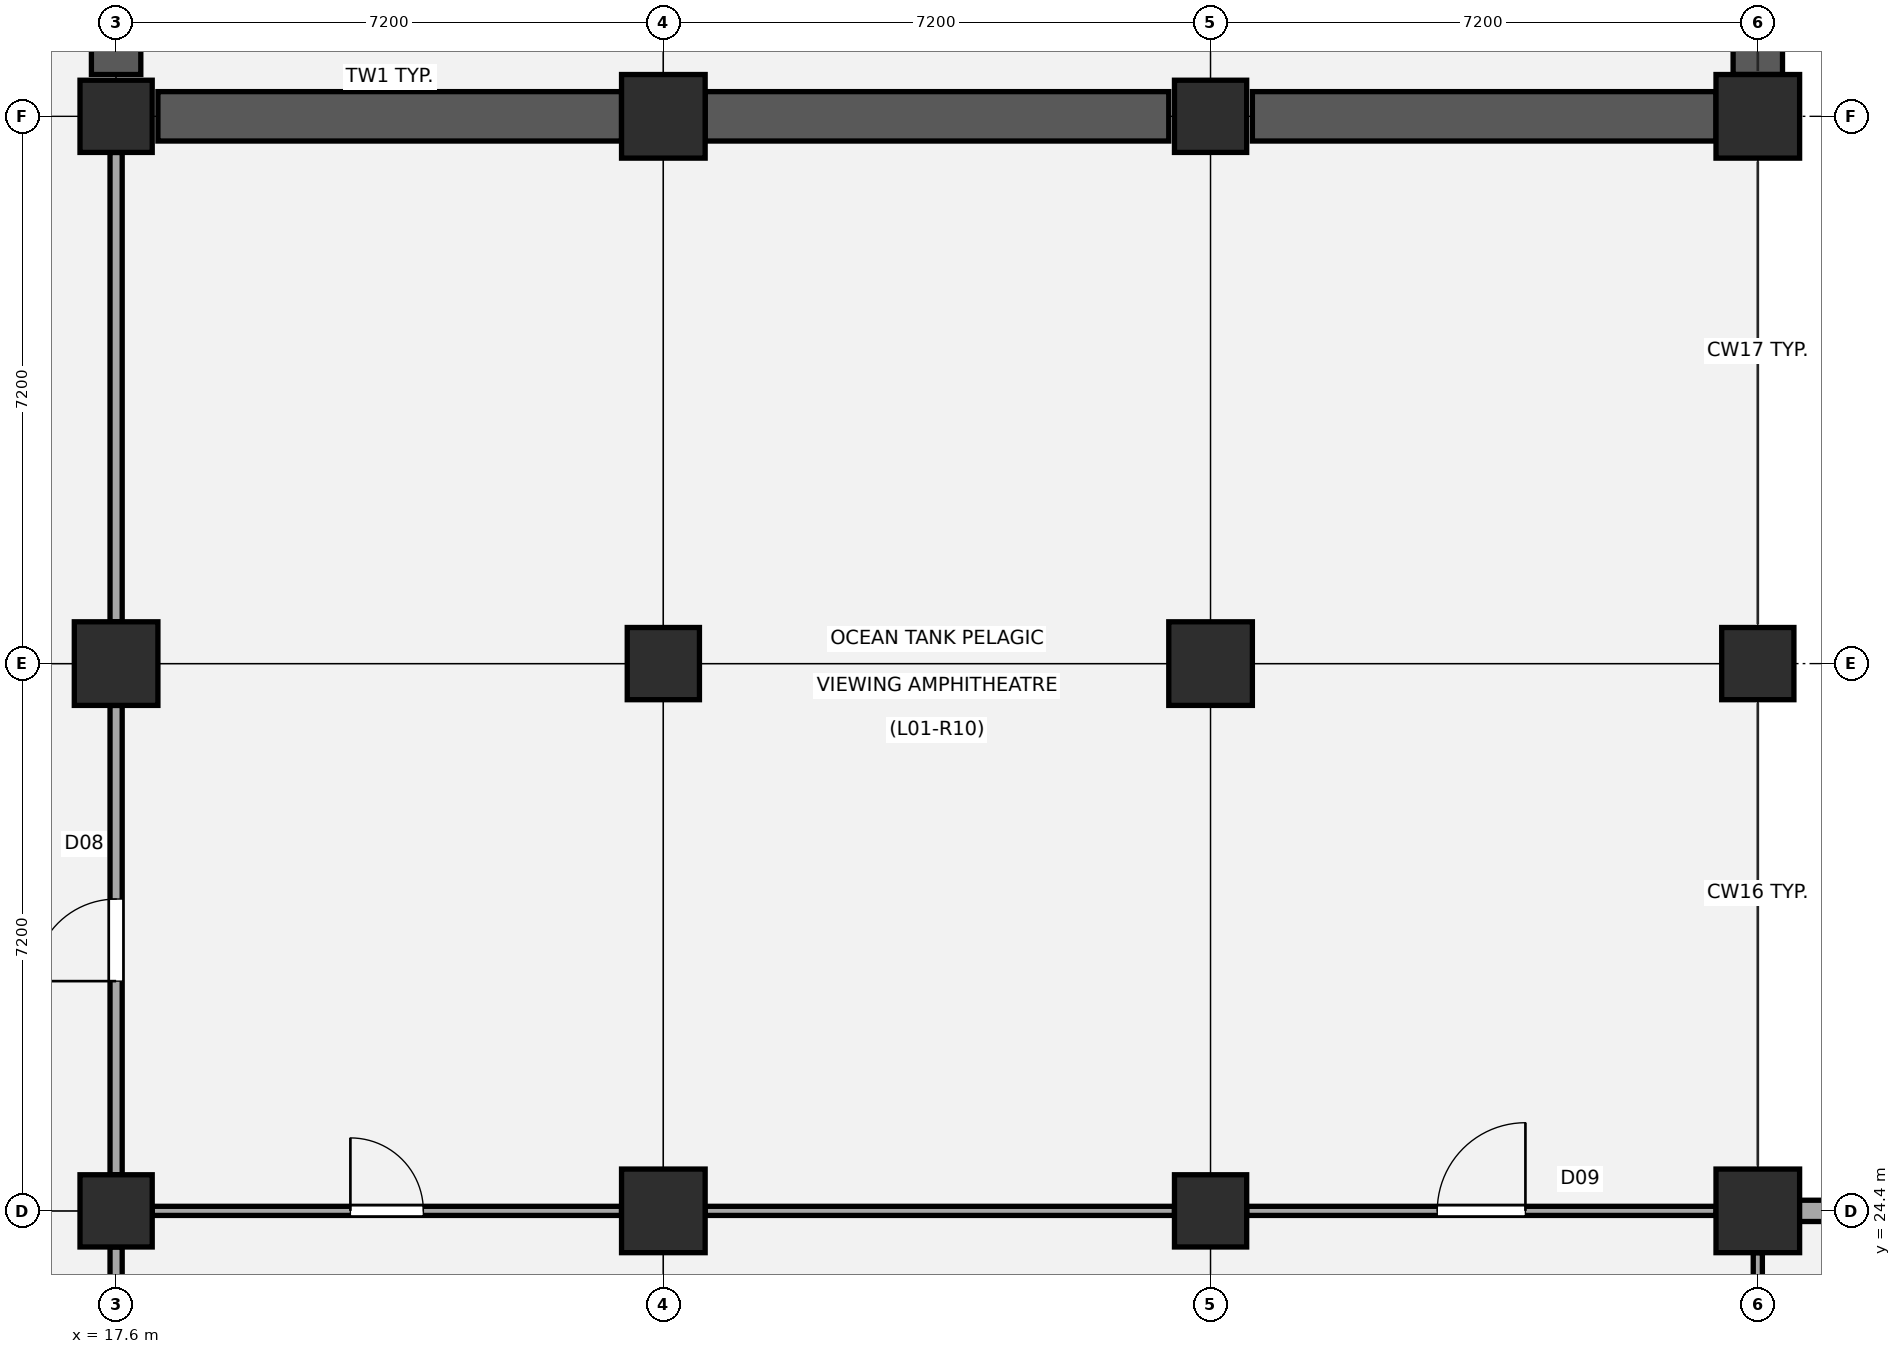
"""IFC4 building model, lengths in metres.
Left out: names, types, materials, properties, quantities, classifications, styles, units other than length and angle.
Written with IfcOpenShell. Run it as: python <this file> out.ifc"""

import sys

from ifc_helpers import new_model, si_unit, direction, frame, frame_2d, origin, origin_2d, place, context, subcontext, project, spatial, rectangle, extrude, element, fill, save


model = new_model("IFC4")
c1 = context("Model", 3, precision=1e-05, world=origin(), true_north=direction((0.0, 1.0)))
c2 = subcontext(c1, "Body", "Model", "MODEL_VIEW")
j1 = project(units=[si_unit("LENGTHUNIT", "METRE"), si_unit("PLANEANGLEUNIT", "RADIAN")], contexts=[c1])
p1 = place(None, origin())
s1 = spatial("IfcSite", under=j1, at=p1, CompositionType="ELEMENT")
p2 = place(p1, origin())
s2 = spatial("IfcBuilding", under=s1, at=p2, CompositionType="ELEMENT")
p3 = place(p2, frame((0.0, 0.0, 4.68)))
s3 = spatial("IfcBuildingStorey", under=s2, at=p3, CompositionType="ELEMENT", Elevation=4.68)
p4 = place(p3, frame((17.6, 24.4, 0.0), z_axis=(0.0, 0.0, 1.0), x_axis=(1.0, 0.0, 0.0)))
e1 = element("IfcColumn", 1, at=p4, inside=s3, PredefinedType="COLUMN", context=c2, shape_type="SweptSolid", body=[
    extrude(rectangle(XDim=0.95, YDim=0.95, at=origin_2d()), origin(), (0.0, 0.0, 1.0), 4.5),
])
p5 = place(p3, frame((17.6, 31.6, 0.0), z_axis=(0.0, 0.0, 1.0), x_axis=(1.0, 0.0, 0.0)))
e2 = element("IfcColumn", 2, at=p5, inside=s3, PredefinedType="COLUMN", context=c2, shape_type="SweptSolid", body=[
    extrude(rectangle(XDim=1.1, YDim=1.1, at=origin_2d()), origin(), (0.0, 0.0, 1.0), 4.5),
])
p6 = place(p3, frame((17.6, 38.8, 0.0), z_axis=(0.0, 0.0, 1.0), x_axis=(1.0, 0.0, 0.0)))
e3 = element("IfcColumn", 3, at=p6, inside=s3, PredefinedType="COLUMN", context=c2, shape_type="SweptSolid", body=[
    extrude(rectangle(XDim=0.95, YDim=0.95, at=origin_2d()), origin(), (0.0, 0.0, 1.0), 4.5),
])
p7 = place(p3, frame((24.8, 24.4, 0.0), z_axis=(0.0, 0.0, 1.0), x_axis=(1.0, 0.0, 0.0)))
e4 = element("IfcColumn", 4, at=p7, inside=s3, PredefinedType="COLUMN", context=c2, shape_type="SweptSolid", body=[
    extrude(rectangle(XDim=1.1, YDim=1.1, at=origin_2d()), origin(), (0.0, 0.0, 1.0), 4.5),
])
p8 = place(p3, frame((24.8, 31.6, 0.0), z_axis=(0.0, 0.0, 1.0), x_axis=(1.0, 0.0, 0.0)))
e5 = element("IfcColumn", 5, at=p8, inside=s3, PredefinedType="COLUMN", context=c2, shape_type="SweptSolid", body=[
    extrude(rectangle(XDim=0.95, YDim=0.95, at=origin_2d()), origin(), (0.0, 0.0, 1.0), 4.5),
])
p9 = place(p3, frame((24.8, 38.8, 0.0), z_axis=(0.0, 0.0, 1.0), x_axis=(1.0, 0.0, 0.0)))
e6 = element("IfcColumn", 6, at=p9, inside=s3, PredefinedType="COLUMN", context=c2, shape_type="SweptSolid", body=[
    extrude(rectangle(XDim=1.1, YDim=1.1, at=origin_2d()), origin(), (0.0, 0.0, 1.0), 4.5),
])
p10 = place(p3, frame((32.0, 24.4, 0.0), z_axis=(0.0, 0.0, 1.0), x_axis=(1.0, 0.0, 0.0)))
e7 = element("IfcColumn", 7, at=p10, inside=s3, PredefinedType="COLUMN", context=c2, shape_type="SweptSolid", body=[
    extrude(rectangle(XDim=0.95, YDim=0.95, at=origin_2d()), origin(), (0.0, 0.0, 1.0), 4.5),
])
p11 = place(p3, frame((32.0, 31.6, 0.0), z_axis=(0.0, 0.0, 1.0), x_axis=(1.0, 0.0, 0.0)))
e8 = element("IfcColumn", 8, at=p11, inside=s3, PredefinedType="COLUMN", context=c2, shape_type="SweptSolid", body=[
    extrude(rectangle(XDim=1.1, YDim=1.1, at=origin_2d()), origin(), (0.0, 0.0, 1.0), 4.5),
])
p12 = place(p3, frame((32.0, 38.8, 0.0), z_axis=(0.0, 0.0, 1.0), x_axis=(1.0, 0.0, 0.0)))
e9 = element("IfcColumn", 9, at=p12, inside=s3, PredefinedType="COLUMN", context=c2, shape_type="SweptSolid", body=[
    extrude(rectangle(XDim=0.95, YDim=0.95, at=origin_2d()), origin(), (0.0, 0.0, 1.0), 4.5),
])
p13 = place(p3, frame((39.2, 24.4, 0.0), z_axis=(0.0, 0.0, 1.0), x_axis=(1.0, 0.0, 0.0)))
e10 = element("IfcColumn", 10, at=p13, inside=s3, PredefinedType="COLUMN", context=c2, shape_type="SweptSolid", body=[
    extrude(rectangle(XDim=1.1, YDim=1.1, at=origin_2d()), origin(), (0.0, 0.0, 1.0), 4.5),
])
p14 = place(p3, frame((39.2, 31.6, 0.0), z_axis=(0.0, 0.0, 1.0), x_axis=(1.0, 0.0, 0.0)))
e11 = element("IfcColumn", 11, at=p14, inside=s3, PredefinedType="COLUMN", context=c2, shape_type="SweptSolid", body=[
    extrude(rectangle(XDim=0.95, YDim=0.95, at=origin_2d()), origin(), (0.0, 0.0, 1.0), 4.5),
])
p15 = place(p3, frame((39.2, 38.8, 0.0), z_axis=(0.0, 0.0, 1.0), x_axis=(1.0, 0.0, 0.0)))
e12 = element("IfcColumn", 12, at=p15, inside=s3, PredefinedType="COLUMN", context=c2, shape_type="SweptSolid", body=[
    extrude(rectangle(XDim=1.1, YDim=1.1, at=origin_2d()), origin(), (0.0, 0.0, 1.0), 4.5),
])
p16 = place(p3, frame((18.15, 38.8, 0.0), z_axis=(0.0, 0.0, 1.0), x_axis=(1.0, 0.0, 0.0)))
e13 = element("IfcWall", 13, at=p16, inside=s3, PredefinedType="SHEAR", context=c2, shape_type="SweptSolid", body=[
    extrude(rectangle(XDim=6.1, YDim=0.65, at=frame_2d((3.05, 0.0))), origin(), (0.0, 0.0, 1.0), 4.15),
])
for number, where, z_axis, x_axis in (
    (14, (25.35, 38.8, 0.0), (0.0, 0.0, 1.0), (1.0, 0.0, 0.0)),
    (15, (32.55, 38.8, 0.0), (0.0, 0.0, 1.0), (1.0, 0.0, 0.0)),
):
    element("IfcWall", number, at=place(p3, frame(where, z_axis=z_axis, x_axis=x_axis)), inside=s3, PredefinedType="SHEAR", context=c2, shape_type="SweptSolid", body=[
        extrude(rectangle(XDim=6.1, YDim=0.65, at=frame_2d((3.05, 0.0))), origin(), (0.0, 0.0, 1.0), 4.15),
    ])
p17 = place(p3, frame((17.6, 39.35, 0.0), z_axis=(0.0, 0.0, 1.0), x_axis=(0.0, 1.0, 0.0)))
e16 = element("IfcWall", 16, at=p17, inside=s3, PredefinedType="SHEAR", context=c2, shape_type="SweptSolid", body=[
    extrude(rectangle(XDim=6.1, YDim=0.65, at=frame_2d((3.05, 0.0))), origin(), (0.0, 0.0, 1.0), 3.5),
])
p18 = place(p3, frame((39.2, 39.35, 0.0), z_axis=(0.0, 0.0, 1.0), x_axis=(0.0, 1.0, 0.0)))
e17 = element("IfcWall", 17, at=p18, inside=s3, PredefinedType="SHEAR", context=c2, shape_type="SweptSolid", body=[
    extrude(rectangle(XDim=6.1, YDim=0.65, at=frame_2d((3.05, 0.0))), origin(), (0.0, 0.0, 1.0), 4.15),
])
p19 = place(p3, frame((39.745, 24.4, 0.0), z_axis=(0.0, 0.0, 1.0), x_axis=(1.0, 0.0, 0.0)))
e18 = element("IfcWall", 18, at=p19, inside=s3, PredefinedType="STANDARD", context=c2, shape_type="SweptSolid", body=[
    extrude(rectangle(XDim=6.185, YDim=0.28, at=frame_2d((3.092, 0.0))), origin(), (0.0, 0.0, 1.0), 3.51),
])
p20 = place(p3, frame((17.6, 17.5, 0.0), z_axis=(0.0, 0.0, 1.0), x_axis=(0.0, 1.0, 0.0)))
e19 = element("IfcWall", 19, at=p20, inside=s3, PredefinedType="PARTITIONING", context=c2, shape_type="SweptSolid", body=[
    extrude(rectangle(XDim=6.425, YDim=0.16, at=frame_2d((3.212, 0.0))), origin(), (0.0, 0.0, 1.0), 3.6),
])
p21 = place(p20, frame((2.183, 0.0, 0.0)))
e20 = element("IfcOpeningElement", 20, at=p21, cuts=e19, PredefinedType="OPENING", context=c2, shape_type="SweptSolid", body=[
    extrude(rectangle(XDim=2.06, YDim=2.28, at=frame_2d((1.03, 1.14))), frame((0.0, 0.09, 0.0), z_axis=(0.0, -1.0, 0.0), x_axis=(1.0, 0.0, 0.0)), (0.0, 0.0, 1.0), 0.18),
])
p22 = place(p3, frame((17.6, 24.875, 0.0), z_axis=(0.0, 0.0, 1.0), x_axis=(0.0, 1.0, 0.0)))
e21 = element("IfcWall", 21, at=p22, inside=s3, PredefinedType="PARTITIONING", context=c2, shape_type="SweptSolid", body=[
    extrude(rectangle(XDim=6.175, YDim=0.16, at=frame_2d((3.087, 0.0))), origin(), (0.0, 0.0, 1.0), 3.59),
])
p23 = place(p22, frame((2.548, 0.0, 0.0)))
e22 = element("IfcOpeningElement", 22, at=p23, cuts=e21, PredefinedType="OPENING", context=c2, shape_type="SweptSolid", body=[
    extrude(rectangle(XDim=1.08, YDim=2.16, at=frame_2d((0.54, 1.08))), frame((0.0, 0.09, 0.0), z_axis=(0.0, -1.0, 0.0), x_axis=(1.0, 0.0, 0.0)), (0.0, 0.0, 1.0), 0.18),
])
p24 = place(p3, frame((17.6, 32.15, 0.0), z_axis=(0.0, 0.0, 1.0), x_axis=(0.0, 1.0, 0.0)))
e23 = element("IfcWall", 23, at=p24, inside=s3, PredefinedType="PARTITIONING", context=c2, shape_type="SweptSolid", body=[
    extrude(rectangle(XDim=6.175, YDim=0.16, at=frame_2d((3.087, 0.0))), origin(), (0.0, 0.0, 1.0), 3.51),
])
p25 = place(p3, frame((18.075, 24.4, 0.0), z_axis=(0.0, 0.0, 1.0), x_axis=(1.0, 0.0, 0.0)))
e24 = element("IfcWall", 24, at=p25, inside=s3, PredefinedType="PARTITIONING", context=c2, shape_type="SweptSolid", body=[
    extrude(rectangle(XDim=6.175, YDim=0.12, at=frame_2d((3.087, 0.0))), origin(), (0.0, 0.0, 1.0), 3.61),
])
p26 = place(p25, frame((2.607, 0.0, 0.0)))
e25 = element("IfcOpeningElement", 25, at=p26, cuts=e24, PredefinedType="OPENING", context=c2, shape_type="SweptSolid", body=[
    extrude(rectangle(XDim=0.96, YDim=2.1, at=frame_2d((0.48, 1.05))), frame((0.0, 0.07, 0.0), z_axis=(0.0, -1.0, 0.0), x_axis=(1.0, 0.0, 0.0)), (0.0, 0.0, 1.0), 0.14),
])
p27 = place(p3, frame((25.35, 24.4, 0.0), z_axis=(0.0, 0.0, 1.0), x_axis=(1.0, 0.0, 0.0)))
e26 = element("IfcWall", 26, at=p27, inside=s3, PredefinedType="PARTITIONING", context=c2, shape_type="SweptSolid", body=[
    extrude(rectangle(XDim=6.175, YDim=0.12, at=frame_2d((3.087, 0.0))), origin(), (0.0, 0.0, 1.0), 3.54),
])
p28 = place(p3, frame((39.2, 17.675, 0.0), z_axis=(0.0, 0.0, 1.0), x_axis=(0.0, 1.0, 0.0)))
e27 = element("IfcWall", 27, at=p28, inside=s3, PredefinedType="PARTITIONING", context=c2, shape_type="SweptSolid", body=[
    extrude(rectangle(XDim=6.175, YDim=0.12, at=frame_2d((3.087, 0.0))), origin(), (0.0, 0.0, 1.0), 3.56),
])
p29 = place(p28, frame((2.548, 0.0, 0.0)))
e28 = element("IfcOpeningElement", 28, at=p29, cuts=e27, PredefinedType="OPENING", context=c2, shape_type="SweptSolid", body=[
    extrude(rectangle(XDim=1.08, YDim=2.16, at=frame_2d((0.54, 1.08))), frame((0.0, 0.07, 0.0), z_axis=(0.0, -1.0, 0.0), x_axis=(1.0, 0.0, 0.0)), (0.0, 0.0, 1.0), 0.14),
])
p30 = place(p3, frame((32.475, 24.4, 0.0), z_axis=(0.0, 0.0, 1.0), x_axis=(1.0, 0.0, 0.0)))
e29 = element("IfcWall", 29, at=p30, inside=s3, PredefinedType="PARTITIONING", context=c2, shape_type="SweptSolid", body=[
    extrude(rectangle(XDim=6.175, YDim=0.12, at=frame_2d((3.087, 0.0))), origin(), (0.0, 0.0, 1.0), 3.61),
])
p31 = place(p30, frame((2.508, 0.0, 0.0)))
e30 = element("IfcOpeningElement", 30, at=p31, cuts=e29, PredefinedType="OPENING", context=c2, shape_type="SweptSolid", body=[
    extrude(rectangle(XDim=1.16, YDim=2.18, at=frame_2d((0.58, 1.09))), frame((0.0, 0.07, 0.0), z_axis=(0.0, -1.0, 0.0), x_axis=(1.0, 0.0, 0.0)), (0.0, 0.0, 1.0), 0.14),
])
p32 = place(p23, origin())
e31 = element("IfcDoor", 31, at=p32, inside=s3, OperationType="SINGLE_SWING_LEFT", PredefinedType="DOOR", context=c2, shape_type="SweptSolid", body=[
    extrude(rectangle(XDim=1.08, YDim=2.16, at=frame_2d((0.54, 1.08))), frame((0.0, 0.025, 0.0), z_axis=(0.0, -1.0, 0.0), x_axis=(1.0, 0.0, 0.0)), (0.0, 0.0, 1.0), 0.05),
])
fill(e22, e31)
p33 = place(p26, origin())
e32 = element("IfcDoor", 32, at=p33, inside=s3, OperationType="SINGLE_SWING_LEFT", PredefinedType="DOOR", context=c2, shape_type="SweptSolid", body=[
    extrude(rectangle(XDim=0.96, YDim=2.1, at=frame_2d((0.48, 1.05))), frame((0.0, 0.025, 0.0), z_axis=(0.0, -1.0, 0.0), x_axis=(1.0, 0.0, 0.0)), (0.0, 0.0, 1.0), 0.05),
])
fill(e25, e32)
p34 = place(p31, origin())
e33 = element("IfcDoor", 33, at=p34, inside=s3, OperationType="SINGLE_SWING_RIGHT", PredefinedType="DOOR", context=c2, shape_type="SweptSolid", body=[
    extrude(rectangle(XDim=1.16, YDim=2.18, at=frame_2d((0.58, 1.09))), frame((0.0, 0.025, 0.0), z_axis=(0.0, -1.0, 0.0), x_axis=(1.0, 0.0, 0.0)), (0.0, 0.0, 1.0), 0.05),
])
fill(e30, e33)
save(model, sys.argv[1])
